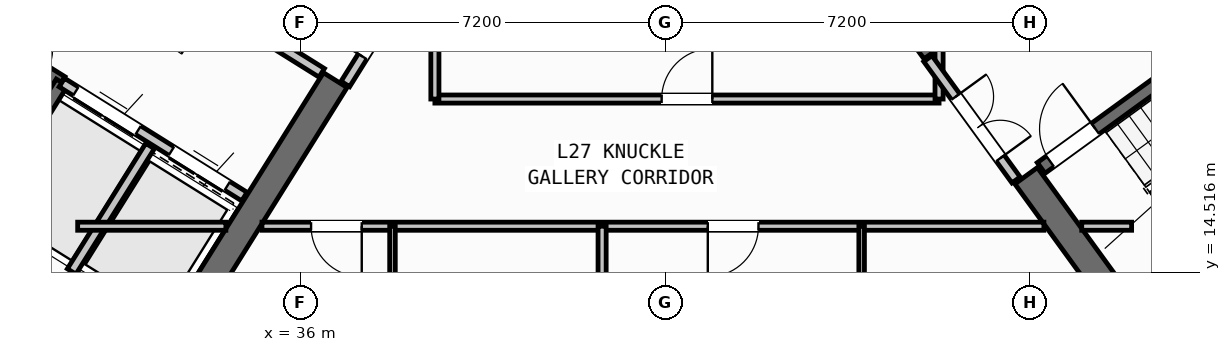
"""IFC4 building model, lengths in metres.
Left out: names, types, materials, properties, quantities, classifications, styles, units other than length and angle.
Written with IfcOpenShell. Run it as: python <this file> out.ifc"""

import sys

from ifc_helpers import new_model, si_unit, direction, frame, frame_2d, origin, place, context, subcontext, project, spatial, rectangle, extrude, source, transform, mapped, element, fill, save


model = new_model("IFC4")
c1 = context("Model", 3, precision=1e-05, world=origin(), true_north=direction((0.0, 1.0)))
c2 = subcontext(c1, "Body", "Model", "MODEL_VIEW")
j1 = project(units=[si_unit("LENGTHUNIT", "METRE"), si_unit("PLANEANGLEUNIT", "RADIAN")], contexts=[c1])
p1 = place(None, origin())
s1 = spatial("IfcSite", under=j1, at=p1, CompositionType="ELEMENT")
p2 = place(p1, origin())
s2 = spatial("IfcBuilding", under=s1, at=p2, CompositionType="ELEMENT")
p3 = place(p2, frame((0.0, 0.0, 108.9)))
s3 = spatial("IfcBuildingStorey", under=s2, at=p3, CompositionType="ELEMENT", Elevation=108.9)
p4 = place(p3, frame((33.366, 12.477, 0.0), z_axis=(0.0, 0.0, 1.0), x_axis=(-0.848047359947, 0.529920442413, 0.0)))
e1 = element("IfcWall", 1, at=p4, inside=s3, PredefinedType="SHEAR", context=c2, shape_type="SweptSolid", body=[
    extrude(rectangle(XDim=13.14, YDim=0.55, at=frame_2d((6.57, 0.0))), origin(), (0.0, 0.0, 1.0), 3.35),
])
p5 = place(p3, frame((36.683, 18.304, 0.0), z_axis=(0.0, 0.0, 1.0), x_axis=(-0.529896466841, -0.848062341122, 0.0)))
e2 = element("IfcWall", 2, at=p5, inside=s3, PredefinedType="SHEAR", context=c2, shape_type="SweptSolid", body=[
    extrude(rectangle(XDim=6.425, YDim=0.55, at=frame_2d((3.212, 0.0))), origin(), (0.0, 0.0, 1.0), 3.35),
])
p6 = place(p3, frame((52.359, 13.14, 0.0), z_axis=(0.0, 0.0, 1.0), x_axis=(0.809014896919, 0.587788139183, 0.0)))
e3 = element("IfcWall", 3, at=p6, inside=s3, PredefinedType="SHEAR", context=c2, shape_type="SweptSolid", body=[
    extrude(rectangle(XDim=12.34, YDim=0.55, at=frame_2d((6.17, 0.0))), origin(), (0.0, 0.0, 1.0), 3.35),
])
p7 = place(p3, frame((52.42, 13.524, 0.0), z_axis=(0.0, 0.0, 1.0), x_axis=(-0.587802113096, 0.809004744015, 0.0)))
e4 = element("IfcWall", 4, at=p7, inside=s3, PredefinedType="SHEAR", context=c2, shape_type="SweptSolid", body=[
    extrude(rectangle(XDim=3.575, YDim=0.55, at=frame_2d((1.788, 0.0))), origin(), (0.0, 0.0, 1.0), 3.35),
])
p8 = place(p3, frame((48.526, 18.884, 0.0), z_axis=(0.0, 0.0, 1.0), x_axis=(-0.587764933797, 0.809031756236, 0.0)))
e5 = element("IfcWall", 5, at=p8, inside=s3, PredefinedType="SHEAR", context=c2, shape_type="SweptSolid", body=[
    extrude(rectangle(XDim=6.425, YDim=0.55, at=frame_2d((3.212, 0.0))), origin(), (0.0, 0.0, 1.0), 3.35),
])
p9 = place(p3, frame((31.76, 12.183, 0.0), z_axis=(0.0, 0.0, 1.0), x_axis=(-0.848047074256, 0.529920899612, 0.0)))
e6 = element("IfcWall", 6, at=p9, inside=s3, PredefinedType="STANDARD", context=c2, shape_type="SweptSolid", body=[
    extrude(rectangle(XDim=30.652, YDim=0.32, at=frame_2d((15.326, 0.0))), origin(), (0.0, 0.0, 1.0), 3.35),
])
p10 = place(p9, frame((15.153, 0.0, 0.0)))
e7 = element("IfcOpeningElement", 7, at=p10, cuts=e6, PredefinedType="OPENING", context=c2, shape_type="SweptSolid", body=[
    extrude(rectangle(XDim=1.2, YDim=2.15, at=frame_2d((0.6, 1.075))), frame((0.0, 0.17, 0.0), z_axis=(0.0, -1.0, 0.0), x_axis=(1.0, 0.0, 0.0)), (0.0, 0.0, 1.0), 0.34),
])
p11 = place(p9, frame((2.002, 0.0, 0.8)))
e8 = element("IfcOpeningElement", 8, at=p11, cuts=e6, PredefinedType="OPENING", context=c2, shape_type="SweptSolid", body=[
    extrude(rectangle(XDim=2.1, YDim=1.55, at=frame_2d((1.05, 0.775))), frame((0.0, 0.17, 0.0), z_axis=(0.0, -1.0, 0.0), x_axis=(1.0, 0.0, 0.0)), (0.0, 0.0, 1.0), 0.34),
])
p12 = place(p9, frame((7.206, 0.0, 0.8)))
e9 = element("IfcOpeningElement", 9, at=p12, cuts=e6, PredefinedType="OPENING", context=c2, shape_type="SweptSolid", body=[
    extrude(rectangle(XDim=2.1, YDim=1.55, at=frame_2d((1.05, 0.775))), frame((0.0, 0.17, 0.0), z_axis=(0.0, -1.0, 0.0), x_axis=(1.0, 0.0, 0.0)), (0.0, 0.0, 1.0), 0.34),
])
p13 = place(p9, frame((12.648, 0.0, 1.0)))
e10 = element("IfcOpeningElement", 10, at=p13, cuts=e6, PredefinedType="OPENING", context=c2, shape_type="SweptSolid", body=[
    extrude(rectangle(XDim=0.9, YDim=1.25, at=frame_2d((0.45, 0.625))), frame((0.0, 0.17, 0.0), z_axis=(0.0, -1.0, 0.0), x_axis=(1.0, 0.0, 0.0)), (0.0, 0.0, 1.0), 0.34),
])
p14 = place(p9, frame((19.59, 0.0, 0.95)))
e11 = element("IfcOpeningElement", 11, at=p14, cuts=e6, PredefinedType="OPENING", context=c2, shape_type="SweptSolid", body=[
    extrude(rectangle(XDim=1.2, YDim=1.4, at=frame_2d((0.6, 0.7))), frame((0.0, 0.17, 0.0), z_axis=(0.0, -1.0, 0.0), x_axis=(1.0, 0.0, 0.0)), (0.0, 0.0, 1.0), 0.34),
])
p15 = place(p9, frame((25.966, 0.0, 1.0)))
e12 = element("IfcOpeningElement", 12, at=p15, cuts=e6, PredefinedType="OPENING", context=c2, shape_type="SweptSolid", body=[
    extrude(rectangle(XDim=0.9, YDim=1.25, at=frame_2d((0.45, 0.625))), frame((0.0, 0.17, 0.0), z_axis=(0.0, -1.0, 0.0), x_axis=(1.0, 0.0, 0.0)), (0.0, 0.0, 1.0), 0.34),
])
p16 = place(p9, frame((28.871, 0.0, 1.0)))
e13 = element("IfcOpeningElement", 13, at=p16, cuts=e6, PredefinedType="OPENING", context=c2, shape_type="SweptSolid", body=[
    extrude(rectangle(XDim=0.9, YDim=1.25, at=frame_2d((0.45, 0.625))), frame((0.0, 0.17, 0.0), z_axis=(0.0, -1.0, 0.0), x_axis=(1.0, 0.0, 0.0)), (0.0, 0.0, 1.0), 0.34),
])
p17 = place(p3, frame((31.28, 18.261, 0.0), z_axis=(0.0, 0.0, 1.0), x_axis=(-0.848051618787, 0.529913626805, 0.0)))
e14 = element("IfcWall", 14, at=p17, inside=s3, PredefinedType="SHEAR", context=c2, shape_type="SweptSolid", body=[
    extrude(rectangle(XDim=7.46, YDim=0.26, at=frame_2d((3.73, 0.0))), origin(), (0.0, 0.0, 1.0), 3.35),
])
p18 = place(p17, frame((0.36, 0.0, 0.0)))
e15 = element("IfcOpeningElement", 15, at=p18, cuts=e14, PredefinedType="OPENING", context=c2, shape_type="SweptSolid", body=[
    extrude(rectangle(XDim=0.86, YDim=2.05, at=frame_2d((0.43, 1.025))), frame((0.0, 0.14, 0.0), z_axis=(0.0, -1.0, 0.0), x_axis=(1.0, 0.0, 0.0)), (0.0, 0.0, 1.0), 0.28),
])
p19 = place(p3, frame((31.288, 18.256, 0.0), z_axis=(0.0, 0.0, 1.0), x_axis=(-0.529943379326, -0.848033026897, 0.0)))
e16 = element("IfcWall", 16, at=p19, inside=s3, PredefinedType="SHEAR", context=c2, shape_type="SweptSolid", body=[
    extrude(rectangle(XDim=3.16, YDim=0.26, at=frame_2d((1.58, 0.0))), origin(), (0.0, 0.0, 1.0), 3.35),
])
p20 = place(p3, frame((34.891, 16.005, 0.0), z_axis=(0.0, 0.0, 1.0), x_axis=(-0.848062873452, 0.529895614884, 0.0)))
e17 = element("IfcWall", 17, at=p20, inside=s3, PredefinedType="STANDARD", context=c2, shape_type="SweptSolid", body=[
    extrude(rectangle(XDim=4.248, YDim=0.2, at=frame_2d((2.124, 0.0))), origin(), (0.0, 0.0, 1.0), 3.34),
])
p21 = place(p20, frame((0.398, 0.0, 0.0)))
e18 = element("IfcOpeningElement", 18, at=p21, cuts=e17, PredefinedType="OPENING", context=c2, shape_type="SweptSolid", body=[
    extrude(rectangle(XDim=1.3, YDim=2.2, at=frame_2d((0.65, 1.1))), frame((0.0, 0.11, 0.0), z_axis=(0.0, -1.0, 0.0), x_axis=(1.0, 0.0, 0.0)), (0.0, 0.0, 1.0), 0.22),
])
p22 = place(p20, frame((2.473, 0.0, 0.0)))
e19 = element("IfcOpeningElement", 19, at=p22, cuts=e17, PredefinedType="OPENING", context=c2, shape_type="SweptSolid", body=[
    extrude(rectangle(XDim=1.45, YDim=2.25, at=frame_2d((0.725, 1.125))), frame((0.0, 0.11, 0.0), z_axis=(0.0, -1.0, 0.0), x_axis=(1.0, 0.0, 0.0)), (0.0, 0.0, 1.0), 0.22),
])
p23 = place(p3, frame((36.417, 18.447, 0.0), z_axis=(0.0, 0.0, 1.0), x_axis=(-0.848064879198, 0.529892404805, 0.0)))
e20 = element("IfcWall", 20, at=p23, inside=s3, PredefinedType="STANDARD", context=c2, shape_type="SweptSolid", body=[
    extrude(rectangle(XDim=5.768, YDim=0.2, at=frame_2d((2.884, 0.0))), origin(), (0.0, 0.0, 1.0), 3.34),
])
p24 = place(p23, frame((2.548, 0.0, 0.0)))
e21 = element("IfcOpeningElement", 21, at=p24, cuts=e20, PredefinedType="OPENING", context=c2, shape_type="SweptSolid", body=[
    extrude(rectangle(XDim=1.15, YDim=2.1, at=frame_2d((0.575, 1.05))), frame((0.0, 0.11, 0.0), z_axis=(0.0, -1.0, 0.0), x_axis=(1.0, 0.0, 0.0)), (0.0, 0.0, 1.0), 0.22),
])
p25 = place(p3, frame((33.029, 17.003, 0.0), z_axis=(0.0, 0.0, 1.0), x_axis=(-0.529916267533, -0.848049968695, 0.0)))
e22 = element("IfcWall", 22, at=p25, inside=s3, PredefinedType="STANDARD", context=c2, shape_type="SweptSolid", body=[
    extrude(rectangle(XDim=2.92, YDim=0.2, at=frame_2d((1.46, 0.0))), origin(), (0.0, 0.0, 1.0), 3.34),
])
p26 = place(p3, frame((52.472, 14.013, 0.0), z_axis=(0.0, 0.0, 1.0), x_axis=(0.809028366311, 0.587769599847, 0.0)))
e23 = element("IfcWall", 23, at=p26, inside=s3, PredefinedType="SHEAR", context=c2, shape_type="SweptSolid", body=[
    extrude(rectangle(XDim=7.33, YDim=0.26, at=frame_2d((3.665, 0.0))), origin(), (0.0, 0.0, 1.0), 3.35),
])
p27 = place(p3, frame((50.615, 16.57, 0.0), z_axis=(0.0, 0.0, 1.0), x_axis=(0.809028366311, 0.587769599847, 0.0)))
e24 = element("IfcWall", 24, at=p27, inside=s3, PredefinedType="SHEAR", context=c2, shape_type="SweptSolid", body=[
    extrude(rectangle(XDim=7.33, YDim=0.26, at=frame_2d((3.665, 0.0))), origin(), (0.0, 0.0, 1.0), 3.35),
])
p28 = place(p27, frame((0.22, 0.0, 0.0)))
e25 = element("IfcOpeningElement", 25, at=p28, cuts=e24, PredefinedType="OPENING", context=c2, shape_type="SweptSolid", body=[
    extrude(rectangle(XDim=1.1, YDim=2.1, at=frame_2d((0.55, 1.05))), frame((0.0, 0.14, 0.0), z_axis=(0.0, -1.0, 0.0), x_axis=(1.0, 0.0, 0.0)), (0.0, 0.0, 1.0), 0.28),
])
p29 = place(p3, frame((38.451, 20.737, 0.0), z_axis=(0.0, 0.0, 1.0), x_axis=(-0.529924799939, -0.848044637038, 0.0)))
e26 = element("IfcWall", 26, at=p29, inside=s3, PredefinedType="STANDARD", context=c2, shape_type="SweptSolid", body=[
    extrude(rectangle(XDim=2.96, YDim=0.2, at=frame_2d((1.48, 0.0))), origin(), (0.0, 0.0, 1.0), 3.34),
])
p30 = place(p29, frame((1.46, 0.0, 0.0)))
e27 = element("IfcOpeningElement", 27, at=p30, cuts=e26, PredefinedType="OPENING", context=c2, shape_type="SweptSolid", body=[
    extrude(rectangle(XDim=0.86, YDim=2.05, at=frame_2d((0.43, 1.025))), frame((0.0, 0.11, 0.0), z_axis=(0.0, -1.0, 0.0), x_axis=(1.0, 0.0, 0.0)), (0.0, 0.0, 1.0), 0.22),
])
p31 = place(p3, frame((31.6, 15.42, 0.0), z_axis=(0.0, 0.0, 1.0), x_axis=(1.0, 0.0, 0.0)))
e28 = element("IfcWall", 28, at=p31, inside=s3, PredefinedType="PARTITIONING", context=c2, shape_type="SweptSolid", body=[
    extrude(rectangle(XDim=2.925, YDim=0.16, at=frame_2d((1.462, 0.0))), origin(), (0.0, 0.0, 1.0), 3.34),
])
p32 = place(p3, frame((35.237, 15.42, 0.0), z_axis=(0.0, 0.0, 1.0), x_axis=(1.0, 0.0, 0.0)))
e29 = element("IfcWall", 29, at=p32, inside=s3, PredefinedType="PARTITIONING", context=c2, shape_type="SweptSolid", body=[
    extrude(rectangle(XDim=15.432, YDim=0.16, at=frame_2d((7.716, 0.0))), origin(), (0.0, 0.0, 1.0), 3.34),
])
p33 = place(p32, frame((0.969, 0.0, 0.0)))
e30 = element("IfcOpeningElement", 30, at=p33, cuts=e29, PredefinedType="OPENING", context=c2, shape_type="SweptSolid", body=[
    extrude(rectangle(XDim=1.0, YDim=2.1, at=frame_2d((0.5, 1.05))), frame((0.0, 0.09, 0.0), z_axis=(0.0, -1.0, 0.0), x_axis=(1.0, 0.0, 0.0)), (0.0, 0.0, 1.0), 0.18),
])
p34 = place(p32, frame((8.799, 0.0, 0.0)))
e31 = element("IfcOpeningElement", 31, at=p34, cuts=e29, PredefinedType="OPENING", context=c2, shape_type="SweptSolid", body=[
    extrude(rectangle(XDim=1.0, YDim=2.1, at=frame_2d((0.5, 1.05))), frame((0.0, 0.09, 0.0), z_axis=(0.0, -1.0, 0.0), x_axis=(1.0, 0.0, 0.0)), (0.0, 0.0, 1.0), 0.18),
])
p35 = place(p3, frame((51.416, 15.42, 0.0), z_axis=(0.0, 0.0, 1.0), x_axis=(1.0, 0.0, 0.0)))
e32 = element("IfcWall", 32, at=p35, inside=s3, PredefinedType="PARTITIONING", context=c2, shape_type="SweptSolid", body=[
    extrude(rectangle(XDim=0.984, YDim=0.16, at=frame_2d((0.492, 0.0))), origin(), (0.0, 0.0, 1.0), 3.34),
])
p36 = place(p3, frame((38.65, 17.93, 0.0), z_axis=(0.0, 0.0, 1.0), x_axis=(1.0, 0.0, 0.0)))
e33 = element("IfcWall", 33, at=p36, inside=s3, PredefinedType="PARTITIONING", context=c2, shape_type="SweptSolid", body=[
    extrude(rectangle(XDim=9.95, YDim=0.16, at=frame_2d((4.975, 0.0))), origin(), (0.0, 0.0, 1.0), 3.34),
])
p37 = place(p36, frame((4.475, 0.0, 0.0)))
e34 = element("IfcOpeningElement", 34, at=p37, cuts=e33, PredefinedType="OPENING", context=c2, shape_type="SweptSolid", body=[
    extrude(rectangle(XDim=1.0, YDim=2.1, at=frame_2d((0.5, 1.05))), frame((0.0, 0.09, 0.0), z_axis=(0.0, -1.0, 0.0), x_axis=(1.0, 0.0, 0.0)), (0.0, 0.0, 1.0), 0.18),
])
p38 = place(p3, frame((38.65, 17.93, 0.0), z_axis=(0.0, 0.0, 1.0), x_axis=(0.0, 1.0, 0.0)))
e35 = element("IfcWall", 35, at=p38, inside=s3, PredefinedType="PARTITIONING", context=c2, shape_type="SweptSolid", body=[
    extrude(rectangle(XDim=2.951, YDim=0.16, at=frame_2d((1.476, 0.0))), origin(), (0.0, 0.0, 1.0), 3.34),
])
p39 = place(p3, frame((48.6, 17.93, 0.0), z_axis=(0.0, 0.0, 1.0), x_axis=(0.0, 1.0, 0.0)))
e36 = element("IfcWall", 36, at=p39, inside=s3, PredefinedType="PARTITIONING", context=c2, shape_type="SweptSolid", body=[
    extrude(rectangle(XDim=0.993, YDim=0.16, at=frame_2d((0.496, 0.0))), origin(), (0.0, 0.0, 1.0), 3.34),
])
p40 = place(p3, frame((50.119, 16.333, 0.0), z_axis=(0.0, 0.0, 1.0), x_axis=(-0.587749856981, 0.809042709391, 0.0)))
e37 = element("IfcWall", 37, at=p40, inside=s3, PredefinedType="STANDARD", context=c2, shape_type="SweptSolid", body=[
    extrude(rectangle(XDim=2.96, YDim=0.2, at=frame_2d((1.48, 0.0))), origin(), (0.0, 0.0, 1.0), 3.34),
])
p41 = place(p40, frame((0.53, 0.0, 0.0)))
e38 = element("IfcOpeningElement", 38, at=p41, cuts=e37, PredefinedType="OPENING", context=c2, shape_type="SweptSolid", body=[
    extrude(rectangle(XDim=1.5, YDim=2.15, at=frame_2d((0.75, 1.075))), frame((0.0, 0.11, 0.0), z_axis=(0.0, -1.0, 0.0), x_axis=(1.0, 0.0, 0.0)), (0.0, 0.0, 1.0), 0.22),
])
p42 = place(p3, frame((41.95, 1.96, 0.0), z_axis=(0.0, 0.0, 1.0), x_axis=(0.0, 1.0, 0.0)))
e39 = element("IfcWall", 39, at=p42, inside=s3, PredefinedType="PARTITIONING", context=c2, shape_type="SweptSolid", body=[
    extrude(rectangle(XDim=13.46, YDim=0.16, at=frame_2d((6.73, 0.0))), origin(), (0.0, 0.0, 1.0), 3.34),
])
p43 = place(p3, frame((37.813, 1.96, 0.0), z_axis=(0.0, 0.0, 1.0), x_axis=(0.0, 1.0, 0.0)))
e40 = element("IfcWall", 40, at=p43, inside=s3, PredefinedType="PARTITIONING", context=c2, shape_type="SweptSolid", body=[
    extrude(rectangle(XDim=13.46, YDim=0.11, at=frame_2d((6.73, 0.0))), origin(), (0.0, 0.0, 1.0), 3.34),
])
p44 = place(p43, frame((5.5, 0.0, 0.0)))
e41 = element("IfcOpeningElement", 41, at=p44, cuts=e40, PredefinedType="OPENING", context=c2, shape_type="SweptSolid", body=[
    extrude(rectangle(XDim=0.92, YDim=2.08, at=frame_2d((0.46, 1.04))), frame((0.0, 0.065, 0.0), z_axis=(0.0, -1.0, 0.0), x_axis=(1.0, 0.0, 0.0)), (0.0, 0.0, 1.0), 0.13),
])
p45 = place(p43, frame((10.89, 0.0, 0.0)))
e42 = element("IfcOpeningElement", 42, at=p45, cuts=e40, PredefinedType="OPENING", context=c2, shape_type="SweptSolid", body=[
    extrude(rectangle(XDim=0.88, YDim=2.08, at=frame_2d((0.44, 1.04))), frame((0.0, 0.065, 0.0), z_axis=(0.0, -1.0, 0.0), x_axis=(1.0, 0.0, 0.0)), (0.0, 0.0, 1.0), 0.13),
])
p46 = place(p3, frame((47.072, 1.96, 0.0), z_axis=(0.0, 0.0, 1.0), x_axis=(0.0, 1.0, 0.0)))
e43 = element("IfcWall", 43, at=p46, inside=s3, PredefinedType="PARTITIONING", context=c2, shape_type="SweptSolid", body=[
    extrude(rectangle(XDim=13.46, YDim=0.11, at=frame_2d((6.73, 0.0))), origin(), (0.0, 0.0, 1.0), 3.34),
])
p47 = place(p46, frame((6.6, 0.0, 0.0)))
e44 = element("IfcOpeningElement", 44, at=p47, cuts=e43, PredefinedType="OPENING", context=c2, shape_type="SweptSolid", body=[
    extrude(rectangle(XDim=0.92, YDim=2.08, at=frame_2d((0.46, 1.04))), frame((0.0, 0.065, 0.0), z_axis=(0.0, -1.0, 0.0), x_axis=(1.0, 0.0, 0.0)), (0.0, 0.0, 1.0), 0.13),
])
p48 = place(p46, frame((11.54, 0.0, 0.0)))
e45 = element("IfcOpeningElement", 45, at=p48, cuts=e43, PredefinedType="OPENING", context=c2, shape_type="SweptSolid", body=[
    extrude(rectangle(XDim=0.88, YDim=2.08, at=frame_2d((0.44, 1.04))), frame((0.0, 0.065, 0.0), z_axis=(0.0, -1.0, 0.0), x_axis=(1.0, 0.0, 0.0)), (0.0, 0.0, 1.0), 0.13),
])
m1 = source(origin(), c2, "Body", "SweptSolid", [
    extrude(rectangle(XDim=1.3, YDim=2.2, at=frame_2d((0.65, 1.1))), frame((0.0, 0.025, 0.0), z_axis=(0.0, -1.0, 0.0), x_axis=(1.0, 0.0, 0.0)), (0.0, 0.0, 1.0), 0.05),
])
p49 = place(p21, origin())
e46 = element("IfcDoor", 46, at=p49, inside=s3, OperationType="DOUBLE_DOOR_SLIDING", PredefinedType="DOOR", context=c2, shape_type="MappedRepresentation", body=[
    mapped(m1, transform((0.0, 0.0, 0.0), scale=1.0)),
])
fill(e18, e46)
m2 = source(origin(), c2, "Body", "SweptSolid", [
    extrude(rectangle(XDim=1.45, YDim=2.25, at=frame_2d((0.725, 1.125))), frame((0.0, 0.025, 0.0), z_axis=(0.0, -1.0, 0.0), x_axis=(1.0, 0.0, 0.0)), (0.0, 0.0, 1.0), 0.05),
])
p50 = place(p22, origin())
e47 = element("IfcDoor", 47, at=p50, inside=s3, OperationType="DOUBLE_DOOR_SLIDING", PredefinedType="DOOR", context=c2, shape_type="MappedRepresentation", body=[
    mapped(m2, transform((0.0, 0.0, 0.0), scale=1.0)),
])
fill(e19, e47)
m3 = source(origin(), c2, "Body", "SweptSolid", [
    extrude(rectangle(XDim=1.1, YDim=2.1, at=frame_2d((0.55, 1.05))), frame((0.0, 0.025, 0.0), z_axis=(0.0, -1.0, 0.0), x_axis=(1.0, 0.0, 0.0)), (0.0, 0.0, 1.0), 0.05),
])
p51 = place(p28, origin())
e48 = element("IfcDoor", 48, at=p51, inside=s3, OperationType="SINGLE_SWING_RIGHT", PredefinedType="DOOR", context=c2, shape_type="MappedRepresentation", body=[
    mapped(m3, transform((0.0, 0.0, 0.0), scale=1.0)),
])
fill(e25, e48)
m4 = source(origin(), c2, "Body", "SweptSolid", [
    extrude(rectangle(XDim=1.0, YDim=2.1, at=frame_2d((0.5, 1.05))), frame((0.0, 0.025, 0.0), z_axis=(0.0, -1.0, 0.0), x_axis=(1.0, 0.0, 0.0)), (0.0, 0.0, 1.0), 0.05),
])
p52 = place(p37, origin())
e49 = element("IfcDoor", 49, at=p52, inside=s3, OperationType="SINGLE_SWING_RIGHT", PredefinedType="DOOR", context=c2, shape_type="MappedRepresentation", body=[
    mapped(m4, transform((0.0, 0.0, 0.0), scale=1.0)),
])
fill(e34, e49)
m5 = source(origin(), c2, "Body", "SweptSolid", [
    extrude(rectangle(XDim=0.86, YDim=2.05, at=frame_2d((0.43, 1.025))), frame((0.0, 0.025, 0.0), z_axis=(0.0, -1.0, 0.0), x_axis=(1.0, 0.0, 0.0)), (0.0, 0.0, 1.0), 0.05),
])
p53 = place(p30, frame((0.86, 0.0, 0.0), z_axis=(0.0, 0.0, 1.0), x_axis=(-1.0, 0.0, 0.0)))
e50 = element("IfcDoor", 50, at=p53, inside=s3, OperationType="SINGLE_SWING_LEFT", PredefinedType="DOOR", context=c2, shape_type="MappedRepresentation", body=[
    mapped(m5, transform((0.0, 0.0, 0.0), scale=1.0)),
])
fill(e27, e50)
m6 = source(origin(), c2, "Body", "SweptSolid", [
    extrude(rectangle(XDim=1.5, YDim=2.15, at=frame_2d((0.75, 1.075))), frame((0.0, 0.025, 0.0), z_axis=(0.0, -1.0, 0.0), x_axis=(1.0, 0.0, 0.0)), (0.0, 0.0, 1.0), 0.05),
])
p54 = place(p41, frame((1.5, 0.0, 0.0), z_axis=(0.0, 0.0, 1.0), x_axis=(-1.0, 0.0, 0.0)))
e51 = element("IfcDoor", 51, at=p54, inside=s3, OperationType="DOUBLE_DOOR_SINGLE_SWING", PredefinedType="DOOR", context=c2, shape_type="MappedRepresentation", body=[
    mapped(m6, transform((0.0, 0.0, 0.0), scale=1.0)),
])
fill(e38, e51)
p55 = place(p33, frame((1.0, 0.0, 0.0), z_axis=(0.0, 0.0, 1.0), x_axis=(-1.0, 0.0, 0.0)))
e52 = element("IfcDoor", 52, at=p55, inside=s3, OperationType="SINGLE_SWING_LEFT", PredefinedType="DOOR", context=c2, shape_type="MappedRepresentation", body=[
    mapped(m4, transform((0.0, 0.0, 0.0), scale=1.0)),
])
fill(e30, e52)
p56 = place(p34, frame((1.0, 0.0, 0.0), z_axis=(0.0, 0.0, 1.0), x_axis=(-1.0, 0.0, 0.0)))
e53 = element("IfcDoor", 53, at=p56, inside=s3, OperationType="SINGLE_SWING_RIGHT", PredefinedType="DOOR", context=c2, shape_type="MappedRepresentation", body=[
    mapped(m4, transform((0.0, 0.0, 0.0), scale=1.0)),
])
fill(e31, e53)
save(model, sys.argv[1])
